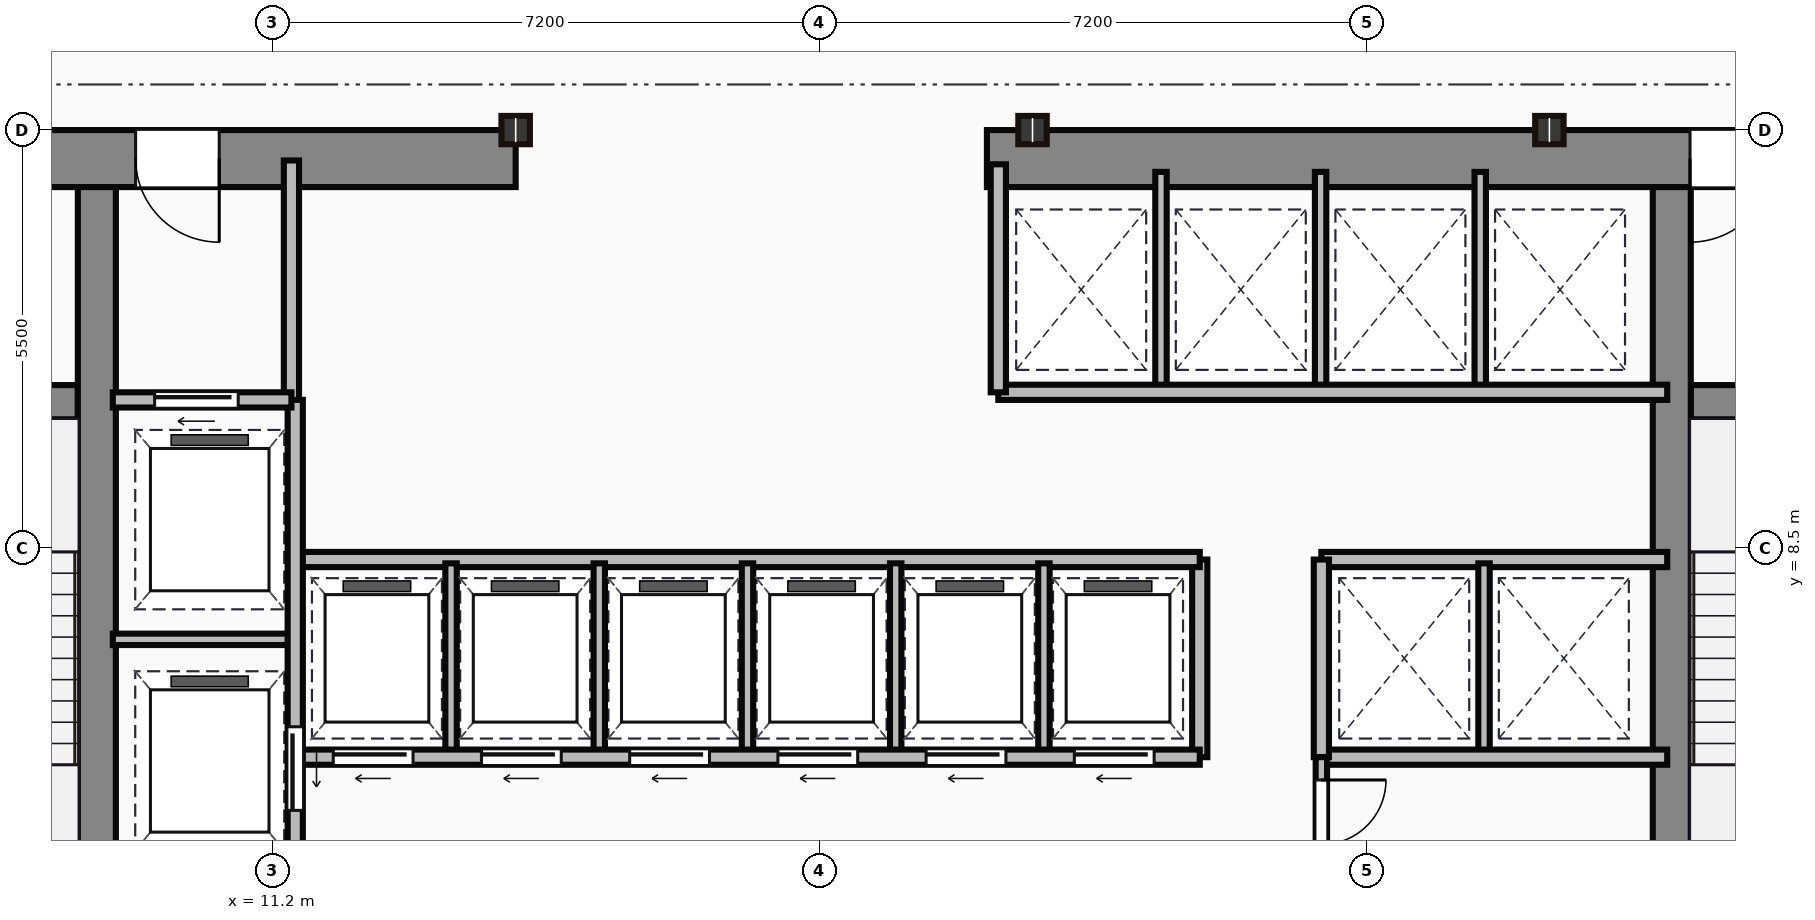
"""IFC4 building model, lengths in metres.
Left out: names, types, materials, properties, quantities, classifications, styles, units other than length and angle.
Written with IfcOpenShell. Run it as: python <this file> out.ifc"""

import sys

from ifc_helpers import new_model, si_unit, direction, frame, frame_2d, origin, origin_2d, place, context, subcontext, project, spatial, rectangle, i_section, extrude, source, transform, mapped, element, fill, save


model = new_model("IFC4")
c1 = context("Model", 3, precision=1e-05, world=origin(), true_north=direction((0.0, 1.0)))
c2 = subcontext(c1, "Body", "Model", "MODEL_VIEW")
j1 = project(units=[si_unit("LENGTHUNIT", "METRE"), si_unit("PLANEANGLEUNIT", "RADIAN")], contexts=[c1])
p1 = place(None, origin())
s1 = spatial("IfcSite", under=j1, at=p1, CompositionType="ELEMENT")
p2 = place(p1, origin())
s2 = spatial("IfcBuilding", under=s1, at=p2, CompositionType="ELEMENT")
p3 = place(p2, frame((0.0, 0.0, 169.8)))
s3 = spatial("IfcBuildingStorey", under=s2, at=p3, CompositionType="ELEMENT", Elevation=169.8)
m1 = source(origin(), c2, "Body", "SweptSolid", [
    extrude(rectangle(XDim=9.1, YDim=0.75, at=frame_2d((4.55, 0.0))), origin(), (0.0, 0.0, 1.0), 3.65),
])
p4 = place(p3, frame((5.3, 13.625, 0.0), z_axis=(0.0, 0.0, 1.0), x_axis=(1.0, 0.0, 0.0)))
e1 = element("IfcWall", 1, at=p4, inside=s3, PredefinedType="SHEAR", context=c2, shape_type="MappedRepresentation", body=[
    mapped(m1, transform((0.0, 0.0, 0.0))),
])
p5 = place(p4, frame((4.1, 0.0, 0.0)))
e2 = element("IfcOpeningElement", 2, at=p5, cuts=e1, PredefinedType="OPENING", context=c2, shape_type="SweptSolid", body=[
    extrude(rectangle(XDim=1.1, YDim=2.15, at=frame_2d((0.55, 1.075))), frame((0.0, 0.385, 0.0), z_axis=(0.0, -1.0, 0.0), x_axis=(1.0, 0.0, 0.0)), (0.0, 0.0, 1.0), 0.77),
])
m2 = source(origin(), c2, "Body", "SweptSolid", [
    extrude(rectangle(XDim=12.6, YDim=0.75, at=frame_2d((6.3, 0.0))), origin(), (0.0, 0.0, 1.0), 3.65),
])
p6 = place(p3, frame((20.6, 13.625, 0.0), z_axis=(0.0, 0.0, 1.0), x_axis=(1.0, 0.0, 0.0)))
e3 = element("IfcWall", 3, at=p6, inside=s3, PredefinedType="SHEAR", context=c2, shape_type="MappedRepresentation", body=[
    mapped(m2, transform((0.0, 0.0, 0.0))),
])
p7 = place(p6, frame((9.25, 0.0, 0.0)))
e4 = element("IfcOpeningElement", 4, at=p7, cuts=e3, PredefinedType="OPENING", context=c2, shape_type="SweptSolid", body=[
    extrude(rectangle(XDim=1.1, YDim=2.15, at=frame_2d((0.55, 1.075))), frame((0.0, 0.385, 0.0), z_axis=(0.0, -1.0, 0.0), x_axis=(1.0, 0.0, 0.0)), (0.0, 0.0, 1.0), 0.77),
])
m3 = source(origin(), c2, "Body", "SweptSolid", [
    extrude(rectangle(XDim=12.35, YDim=0.5, at=frame_2d((6.175, 0.0))), origin(), (0.0, 0.0, 1.0), 3.65),
])
for number, where, z_axis, x_axis in (
    (5, (8.89, 0.9, 0.0), (0.0, 0.0, 1.0), (0.0, 1.0, 0.0)),
    (6, (29.61, 0.9, 0.0), (0.0, 0.0, 1.0), (0.0, 1.0, 0.0)),
):
    element("IfcWall", number, at=place(p3, frame(where, z_axis=z_axis, x_axis=x_axis)), inside=s3, PredefinedType="SHEAR", context=c2, shape_type="MappedRepresentation", body=[
        mapped(m3, transform((0.0, 0.0, 0.0))),
    ])
m4 = source(origin(), c2, "Body", "SweptSolid", [
    extrude(rectangle(XDim=3.39, YDim=0.45, at=frame_2d((1.695, 0.0))), origin(), (0.0, 0.0, 1.0), 3.65),
])
p8 = place(p3, frame((5.25, 10.42, 0.0), z_axis=(0.0, 0.0, 1.0), x_axis=(1.0, 0.0, 0.0)))
e7 = element("IfcWall", 7, at=p8, inside=s3, PredefinedType="SHEAR", context=c2, shape_type="MappedRepresentation", body=[
    mapped(m4, transform((0.0, 0.0, 0.0))),
])
p9 = place(p8, frame((1.05, 0.0, 0.0)))
e8 = element("IfcOpeningElement", 8, at=p9, cuts=e7, PredefinedType="OPENING", context=c2, shape_type="SweptSolid", body=[
    extrude(rectangle(XDim=1.1, YDim=2.15, at=frame_2d((0.55, 1.075))), frame((0.0, 0.235, 0.0), z_axis=(0.0, -1.0, 0.0), x_axis=(1.0, 0.0, 0.0)), (0.0, 0.0, 1.0), 0.47),
])
p10 = place(p3, frame((29.86, 10.42, 0.0), z_axis=(0.0, 0.0, 1.0), x_axis=(1.0, 0.0, 0.0)))
e9 = element("IfcWall", 9, at=p10, inside=s3, PredefinedType="SHEAR", context=c2, shape_type="MappedRepresentation", body=[
    mapped(m4, transform((0.0, 0.0, 0.0))),
])
p11 = place(p10, frame((1.1, 0.0, 0.0)))
e10 = element("IfcOpeningElement", 10, at=p11, cuts=e9, PredefinedType="OPENING", context=c2, shape_type="SweptSolid", body=[
    extrude(rectangle(XDim=1.1, YDim=2.15, at=frame_2d((0.55, 1.075))), frame((0.0, 0.235, 0.0), z_axis=(0.0, -1.0, 0.0), x_axis=(1.0, 0.0, 0.0)), (0.0, 0.0, 1.0), 0.47),
])
m5 = source(origin(), c2, "Body", "SweptSolid", [
    extrude(i_section(OverallWidth=0.374, OverallDepth=0.372, WebThickness=0.016, FlangeThickness=0.026, at=origin_2d()), origin(), (0.0, 0.0, 1.0), 3.65),
])
for number, where, z_axis, x_axis in (
    (11, (14.4, 14.0, 0.0), (0.0, 0.0, 1.0), (1.0, 0.0, 0.0)),
    (12, (21.2, 14.0, 0.0), (0.0, 0.0, 1.0), (1.0, 0.0, 0.0)),
    (13, (28.0, 14.0, 0.0), (0.0, 0.0, 1.0), (1.0, 0.0, 0.0)),
):
    element("IfcColumn", number, at=place(p3, frame(where, z_axis=z_axis, x_axis=x_axis)), inside=s3, PredefinedType="COLUMN", context=c2, shape_type="MappedRepresentation", body=[
        mapped(m5, transform((0.0, 0.0, 0.0))),
    ])
m6 = source(origin(), c2, "Body", "SweptSolid", [
    extrude(rectangle(XDim=3.18, YDim=0.2, at=frame_2d((1.59, 0.0))), origin(), (0.0, 0.0, 1.0), 3.4),
])
p12 = place(p3, frame((11.45, 10.42, 0.0), z_axis=(0.0, 0.0, 1.0), x_axis=(0.0, 1.0, 0.0)))
e14 = element("IfcWall", 14, at=p12, inside=s3, PredefinedType="PARTITIONING", context=c2, shape_type="MappedRepresentation", body=[
    mapped(m6, transform((0.0, 0.0, 0.0))),
])
m7 = source(origin(), c2, "Body", "SweptSolid", [
    extrude(rectangle(XDim=2.35, YDim=0.2, at=frame_2d((1.175, 0.0))), origin(), (0.0, 0.0, 1.0), 3.4),
])
p13 = place(p3, frame((9.1, 10.45, 0.0), z_axis=(0.0, 0.0, 1.0), x_axis=(1.0, 0.0, 0.0)))
e15 = element("IfcWall", 15, at=p13, inside=s3, PredefinedType="PARTITIONING", context=c2, shape_type="MappedRepresentation", body=[
    mapped(m7, transform((0.0, 0.0, 0.0))),
])
p14 = place(p13, frame((0.55, 0.0, 0.0)))
e16 = element("IfcOpeningElement", 16, at=p14, cuts=e15, PredefinedType="OPENING", context=c2, shape_type="SweptSolid", body=[
    extrude(rectangle(XDim=1.1, YDim=2.15, at=frame_2d((0.55, 1.075))), frame((0.0, 0.11, 0.0), z_axis=(0.0, -1.0, 0.0), x_axis=(1.0, 0.0, 0.0)), (0.0, 0.0, 1.0), 0.22),
])
m8 = source(origin(), c2, "Body", "SweptSolid", [
    extrude(rectangle(XDim=9.6, YDim=0.2, at=frame_2d((4.8, 0.0))), origin(), (0.0, 0.0, 1.0), 3.4),
])
p15 = place(p3, frame((11.5, 0.85, 0.0), z_axis=(0.0, 0.0, 1.0), x_axis=(0.0, 1.0, 0.0)))
e17 = element("IfcWall", 17, at=p15, inside=s3, PredefinedType="PARTITIONING", context=c2, shape_type="MappedRepresentation", body=[
    mapped(m8, transform((0.0, 0.0, 0.0))),
])
p16 = place(p15, frame((4.2, 0.0, 0.0)))
e18 = element("IfcOpeningElement", 18, at=p16, cuts=e17, PredefinedType="OPENING", context=c2, shape_type="SweptSolid", body=[
    extrude(rectangle(XDim=1.1, YDim=2.15, at=frame_2d((0.55, 1.075))), frame((0.0, 0.11, 0.0), z_axis=(0.0, -1.0, 0.0), x_axis=(1.0, 0.0, 0.0)), (0.0, 0.0, 1.0), 0.22),
])
p17 = place(p15, frame((0.9, 0.0, 0.0)))
e19 = element("IfcOpeningElement", 19, at=p17, cuts=e17, PredefinedType="OPENING", context=c2, shape_type="SweptSolid", body=[
    extrude(rectangle(XDim=1.2, YDim=2.15, at=frame_2d((0.6, 1.075))), frame((0.0, 0.11, 0.0), z_axis=(0.0, -1.0, 0.0), x_axis=(1.0, 0.0, 0.0)), (0.0, 0.0, 1.0), 0.22),
])
m9 = source(origin(), c2, "Body", "SweptSolid", [
    extrude(rectangle(XDim=2.4, YDim=0.15, at=frame_2d((1.2, 0.0))), origin(), (0.0, 0.0, 1.0), 3.4),
])
p18 = place(p3, frame((9.1, 7.3, 0.0), z_axis=(0.0, 0.0, 1.0), x_axis=(1.0, 0.0, 0.0)))
e20 = element("IfcWall", 20, at=p18, inside=s3, PredefinedType="PARTITIONING", context=c2, shape_type="MappedRepresentation", body=[
    mapped(m9, transform((0.0, 0.0, 0.0))),
])
m10 = source(origin(), c2, "Body", "SweptSolid", [
    extrude(rectangle(XDim=11.85, YDim=0.2, at=frame_2d((5.925, 0.0))), origin(), (0.0, 0.0, 1.0), 3.4),
])
p19 = place(p3, frame((11.55, 5.75, 0.0), z_axis=(0.0, 0.0, 1.0), x_axis=(1.0, 0.0, 0.0)))
e21 = element("IfcWall", 21, at=p19, inside=s3, PredefinedType="PARTITIONING", context=c2, shape_type="MappedRepresentation", body=[
    mapped(m10, transform((0.0, 0.0, 0.0))),
])
p20 = place(p19, frame((0.45, 0.0, 0.0)))
e22 = element("IfcOpeningElement", 22, at=p20, cuts=e21, PredefinedType="OPENING", context=c2, shape_type="SweptSolid", body=[
    extrude(rectangle(XDim=1.05, YDim=2.15, at=frame_2d((0.525, 1.075))), frame((0.0, 0.11, 0.0), z_axis=(0.0, -1.0, 0.0), x_axis=(1.0, 0.0, 0.0)), (0.0, 0.0, 1.0), 0.22),
])
p21 = place(p19, frame((2.4, 0.0, 0.0)))
e23 = element("IfcOpeningElement", 23, at=p21, cuts=e21, PredefinedType="OPENING", context=c2, shape_type="SweptSolid", body=[
    extrude(rectangle(XDim=1.05, YDim=2.15, at=frame_2d((0.525, 1.075))), frame((0.0, 0.11, 0.0), z_axis=(0.0, -1.0, 0.0), x_axis=(1.0, 0.0, 0.0)), (0.0, 0.0, 1.0), 0.22),
])
p22 = place(p19, frame((4.35, 0.0, 0.0)))
e24 = element("IfcOpeningElement", 24, at=p22, cuts=e21, PredefinedType="OPENING", context=c2, shape_type="SweptSolid", body=[
    extrude(rectangle(XDim=1.05, YDim=2.15, at=frame_2d((0.525, 1.075))), frame((0.0, 0.11, 0.0), z_axis=(0.0, -1.0, 0.0), x_axis=(1.0, 0.0, 0.0)), (0.0, 0.0, 1.0), 0.22),
])
p23 = place(p19, frame((6.3, 0.0, 0.0)))
e25 = element("IfcOpeningElement", 25, at=p23, cuts=e21, PredefinedType="OPENING", context=c2, shape_type="SweptSolid", body=[
    extrude(rectangle(XDim=1.05, YDim=2.15, at=frame_2d((0.525, 1.075))), frame((0.0, 0.11, 0.0), z_axis=(0.0, -1.0, 0.0), x_axis=(1.0, 0.0, 0.0)), (0.0, 0.0, 1.0), 0.22),
])
p24 = place(p19, frame((8.25, 0.0, 0.0)))
e26 = element("IfcOpeningElement", 26, at=p24, cuts=e21, PredefinedType="OPENING", context=c2, shape_type="SweptSolid", body=[
    extrude(rectangle(XDim=1.05, YDim=2.15, at=frame_2d((0.525, 1.075))), frame((0.0, 0.11, 0.0), z_axis=(0.0, -1.0, 0.0), x_axis=(1.0, 0.0, 0.0)), (0.0, 0.0, 1.0), 0.22),
])
p25 = place(p19, frame((10.2, 0.0, 0.0)))
e27 = element("IfcOpeningElement", 27, at=p25, cuts=e21, PredefinedType="OPENING", context=c2, shape_type="SweptSolid", body=[
    extrude(rectangle(XDim=1.05, YDim=2.15, at=frame_2d((0.525, 1.075))), frame((0.0, 0.11, 0.0), z_axis=(0.0, -1.0, 0.0), x_axis=(1.0, 0.0, 0.0)), (0.0, 0.0, 1.0), 0.22),
])
p26 = place(p3, frame((11.55, 8.35, 0.0), z_axis=(0.0, 0.0, 1.0), x_axis=(1.0, 0.0, 0.0)))
e28 = element("IfcWall", 28, at=p26, inside=s3, PredefinedType="PARTITIONING", context=c2, shape_type="MappedRepresentation", body=[
    mapped(m10, transform((0.0, 0.0, 0.0))),
])
m11 = source(origin(), c2, "Body", "SweptSolid", [
    extrude(rectangle(XDim=2.6, YDim=0.2, at=frame_2d((1.3, 0.0))), origin(), (0.0, 0.0, 1.0), 3.4),
])
p27 = place(p3, frame((23.4, 5.75, 0.0), z_axis=(0.0, 0.0, 1.0), x_axis=(0.0, 1.0, 0.0)))
e29 = element("IfcWall", 29, at=p27, inside=s3, PredefinedType="PARTITIONING", context=c2, shape_type="MappedRepresentation", body=[
    mapped(m11, transform((0.0, 0.0, 0.0))),
])
m12 = source(origin(), c2, "Body", "SweptSolid", [
    extrude(rectangle(XDim=2.5, YDim=0.15, at=frame_2d((1.25, 0.0))), origin(), (0.0, 0.0, 1.0), 3.4),
])
for number, where, z_axis, x_axis in (
    (30, (13.55, 5.8, 0.0), (0.0, 0.0, 1.0), (0.0, 1.0, 0.0)),
    (31, (15.5, 5.8, 0.0), (0.0, 0.0, 1.0), (0.0, 1.0, 0.0)),
    (32, (17.45, 5.8, 0.0), (0.0, 0.0, 1.0), (0.0, 1.0, 0.0)),
    (33, (19.4, 5.8, 0.0), (0.0, 0.0, 1.0), (0.0, 1.0, 0.0)),
    (34, (21.35, 5.8, 0.0), (0.0, 0.0, 1.0), (0.0, 1.0, 0.0)),
):
    element("IfcWall", number, at=place(p3, frame(where, z_axis=z_axis, x_axis=x_axis)), inside=s3, PredefinedType="PARTITIONING", context=c2, shape_type="MappedRepresentation", body=[
        mapped(m12, transform((0.0, 0.0, 0.0))),
    ])
m13 = source(origin(), c2, "Body", "SweptSolid", [
    extrude(rectangle(XDim=8.8, YDim=0.2, at=frame_2d((4.4, 0.0))), origin(), (0.0, 0.0, 1.0), 3.4),
])
p28 = place(p3, frame((20.75, 10.55, 0.0), z_axis=(0.0, 0.0, 1.0), x_axis=(1.0, 0.0, 0.0)))
e35 = element("IfcWall", 35, at=p28, inside=s3, PredefinedType="PARTITIONING", context=c2, shape_type="MappedRepresentation", body=[
    mapped(m13, transform((0.0, 0.0, 0.0))),
])
m14 = source(origin(), c2, "Body", "SweptSolid", [
    extrude(rectangle(XDim=3.0, YDim=0.2, at=frame_2d((1.5, 0.0))), origin(), (0.0, 0.0, 1.0), 3.4),
])
p29 = place(p3, frame((20.75, 10.55, 0.0), z_axis=(0.0, 0.0, 1.0), x_axis=(0.0, 1.0, 0.0)))
e36 = element("IfcWall", 36, at=p29, inside=s3, PredefinedType="PARTITIONING", context=c2, shape_type="MappedRepresentation", body=[
    mapped(m14, transform((0.0, 0.0, 0.0))),
])
m15 = source(origin(), c2, "Body", "SweptSolid", [
    extrude(rectangle(XDim=2.85, YDim=0.15, at=frame_2d((1.425, 0.0))), origin(), (0.0, 0.0, 1.0), 3.4),
])
for number, where, z_axis, x_axis in (
    (37, (22.89, 10.6, 0.0), (0.0, 0.0, 1.0), (0.0, 1.0, 0.0)),
    (38, (24.99, 10.6, 0.0), (0.0, 0.0, 1.0), (0.0, 1.0, 0.0)),
    (39, (27.09, 10.6, 0.0), (0.0, 0.0, 1.0), (0.0, 1.0, 0.0)),
):
    element("IfcWall", number, at=place(p3, frame(where, z_axis=z_axis, x_axis=x_axis)), inside=s3, PredefinedType="PARTITIONING", context=c2, shape_type="MappedRepresentation", body=[
        mapped(m15, transform((0.0, 0.0, 0.0))),
    ])
m16 = source(origin(), c2, "Body", "SweptSolid", [
    extrude(rectangle(XDim=4.55, YDim=0.2, at=frame_2d((2.275, 0.0))), origin(), (0.0, 0.0, 1.0), 3.4),
])
for number, where, z_axis, x_axis in (
    (40, (25.0, 8.35, 0.0), (0.0, 0.0, 1.0), (1.0, 0.0, 0.0)),
    (41, (25.0, 5.75, 0.0), (0.0, 0.0, 1.0), (1.0, 0.0, 0.0)),
):
    element("IfcWall", number, at=place(p3, frame(where, z_axis=z_axis, x_axis=x_axis)), inside=s3, PredefinedType="PARTITIONING", context=c2, shape_type="MappedRepresentation", body=[
        mapped(m16, transform((0.0, 0.0, 0.0))),
    ])
p30 = place(p3, frame((25.0, 5.75, 0.0), z_axis=(0.0, 0.0, 1.0), x_axis=(0.0, 1.0, 0.0)))
e42 = element("IfcWall", 42, at=p30, inside=s3, PredefinedType="PARTITIONING", context=c2, shape_type="MappedRepresentation", body=[
    mapped(m11, transform((0.0, 0.0, 0.0))),
])
p31 = place(p3, frame((27.14, 5.8, 0.0), z_axis=(0.0, 0.0, 1.0), x_axis=(0.0, 1.0, 0.0)))
e43 = element("IfcWall", 43, at=p31, inside=s3, PredefinedType="PARTITIONING", context=c2, shape_type="MappedRepresentation", body=[
    mapped(m12, transform((0.0, 0.0, 0.0))),
])
m17 = source(origin(), c2, "Body", "SweptSolid", [
    extrude(rectangle(XDim=4.9, YDim=0.15, at=frame_2d((2.45, 0.0))), origin(), (0.0, 0.0, 1.0), 3.4),
])
p32 = place(p3, frame((25.0, 0.85, 0.0), z_axis=(0.0, 0.0, 1.0), x_axis=(0.0, 1.0, 0.0)))
e44 = element("IfcWall", 44, at=p32, inside=s3, PredefinedType="PARTITIONING", context=c2, shape_type="MappedRepresentation", body=[
    mapped(m17, transform((0.0, 0.0, 0.0))),
])
p33 = place(p32, frame((2.0, 0.0, 0.0)))
e45 = element("IfcOpeningElement", 45, at=p33, cuts=e44, PredefinedType="OPENING", context=c2, shape_type="SweptSolid", body=[
    extrude(rectangle(XDim=0.95, YDim=2.15, at=frame_2d((0.475, 1.075))), frame((0.0, 0.085, 0.0), z_axis=(0.0, -1.0, 0.0), x_axis=(1.0, 0.0, 0.0)), (0.0, 0.0, 1.0), 0.17),
])
p34 = place(p32, frame((3.75, 0.0, 0.0)))
e46 = element("IfcOpeningElement", 46, at=p34, cuts=e44, PredefinedType="OPENING", context=c2, shape_type="SweptSolid", body=[
    extrude(rectangle(XDim=0.85, YDim=2.15, at=frame_2d((0.425, 1.075))), frame((0.0, 0.085, 0.0), z_axis=(0.0, -1.0, 0.0), x_axis=(1.0, 0.0, 0.0)), (0.0, 0.0, 1.0), 0.17),
])
m18 = source(origin(), c2, "Body", "SweptSolid", [
    extrude(rectangle(XDim=1.1, YDim=2.15, at=frame_2d((0.55, 1.075))), frame((0.0, 0.025, 0.0), z_axis=(0.0, -1.0, 0.0), x_axis=(1.0, 0.0, 0.0)), (0.0, 0.0, 1.0), 0.05),
])
p35 = place(p5, origin())
e47 = element("IfcDoor", 47, at=p35, inside=s3, OperationType="SINGLE_SWING_RIGHT", PredefinedType="DOOR", context=c2, shape_type="MappedRepresentation", body=[
    mapped(m18, transform((0.0, 0.0, 0.0))),
])
fill(e2, e47)
p36 = place(p7, origin())
e48 = element("IfcDoor", 48, at=p36, inside=s3, OperationType="SINGLE_SWING_LEFT", PredefinedType="DOOR", context=c2, shape_type="MappedRepresentation", body=[
    mapped(m18, transform((0.0, 0.0, 0.0))),
])
fill(e4, e48)
p37 = place(p14, origin())
e49 = element("IfcDoor", 49, at=p37, inside=s3, OperationType="SLIDING_TO_LEFT", PredefinedType="DOOR", context=c2, shape_type="MappedRepresentation", body=[
    mapped(m18, transform((0.0, 0.0, 0.0))),
])
fill(e16, e49)
p38 = place(p16, frame((1.1, 0.0, 0.0), z_axis=(0.0, 0.0, 1.0), x_axis=(-1.0, 0.0, 0.0)))
e50 = element("IfcDoor", 50, at=p38, inside=s3, OperationType="SLIDING_TO_LEFT", PredefinedType="DOOR", context=c2, shape_type="MappedRepresentation", body=[
    mapped(m18, transform((0.0, 0.0, 0.0))),
])
fill(e18, e50)
m19 = source(origin(), c2, "Body", "SweptSolid", [
    extrude(rectangle(XDim=1.05, YDim=2.15, at=frame_2d((0.525, 1.075))), frame((0.0, 0.025, 0.0), z_axis=(0.0, -1.0, 0.0), x_axis=(1.0, 0.0, 0.0)), (0.0, 0.0, 1.0), 0.05),
])
p39 = place(p20, frame((1.05, 0.0, 0.0), z_axis=(0.0, 0.0, 1.0), x_axis=(-1.0, 0.0, 0.0)))
e51 = element("IfcDoor", 51, at=p39, inside=s3, OperationType="SLIDING_TO_LEFT", PredefinedType="DOOR", context=c2, shape_type="MappedRepresentation", body=[
    mapped(m19, transform((0.0, 0.0, 0.0))),
])
fill(e22, e51)
p40 = place(p21, frame((1.05, 0.0, 0.0), z_axis=(0.0, 0.0, 1.0), x_axis=(-1.0, 0.0, 0.0)))
e52 = element("IfcDoor", 52, at=p40, inside=s3, OperationType="SLIDING_TO_LEFT", PredefinedType="DOOR", context=c2, shape_type="MappedRepresentation", body=[
    mapped(m19, transform((0.0, 0.0, 0.0))),
])
fill(e23, e52)
p41 = place(p22, frame((1.05, 0.0, 0.0), z_axis=(0.0, 0.0, 1.0), x_axis=(-1.0, 0.0, 0.0)))
e53 = element("IfcDoor", 53, at=p41, inside=s3, OperationType="SLIDING_TO_LEFT", PredefinedType="DOOR", context=c2, shape_type="MappedRepresentation", body=[
    mapped(m19, transform((0.0, 0.0, 0.0))),
])
fill(e24, e53)
p42 = place(p23, frame((1.05, 0.0, 0.0), z_axis=(0.0, 0.0, 1.0), x_axis=(-1.0, 0.0, 0.0)))
e54 = element("IfcDoor", 54, at=p42, inside=s3, OperationType="SLIDING_TO_LEFT", PredefinedType="DOOR", context=c2, shape_type="MappedRepresentation", body=[
    mapped(m19, transform((0.0, 0.0, 0.0))),
])
fill(e25, e54)
p43 = place(p24, frame((1.05, 0.0, 0.0), z_axis=(0.0, 0.0, 1.0), x_axis=(-1.0, 0.0, 0.0)))
e55 = element("IfcDoor", 55, at=p43, inside=s3, OperationType="SLIDING_TO_LEFT", PredefinedType="DOOR", context=c2, shape_type="MappedRepresentation", body=[
    mapped(m19, transform((0.0, 0.0, 0.0))),
])
fill(e26, e55)
p44 = place(p25, frame((1.05, 0.0, 0.0), z_axis=(0.0, 0.0, 1.0), x_axis=(-1.0, 0.0, 0.0)))
e56 = element("IfcDoor", 56, at=p44, inside=s3, OperationType="SLIDING_TO_LEFT", PredefinedType="DOOR", context=c2, shape_type="MappedRepresentation", body=[
    mapped(m19, transform((0.0, 0.0, 0.0))),
])
fill(e27, e56)
m20 = source(origin(), c2, "Body", "SweptSolid", [
    extrude(rectangle(XDim=0.85, YDim=2.15, at=frame_2d((0.425, 1.075))), frame((0.0, 0.025, 0.0), z_axis=(0.0, -1.0, 0.0), x_axis=(1.0, 0.0, 0.0)), (0.0, 0.0, 1.0), 0.05),
])
p45 = place(p34, origin())
e57 = element("IfcDoor", 57, at=p45, inside=s3, OperationType="SINGLE_SWING_RIGHT", PredefinedType="DOOR", context=c2, shape_type="MappedRepresentation", body=[
    mapped(m20, transform((0.0, 0.0, 0.0))),
])
fill(e46, e57)
save(model, sys.argv[1])
